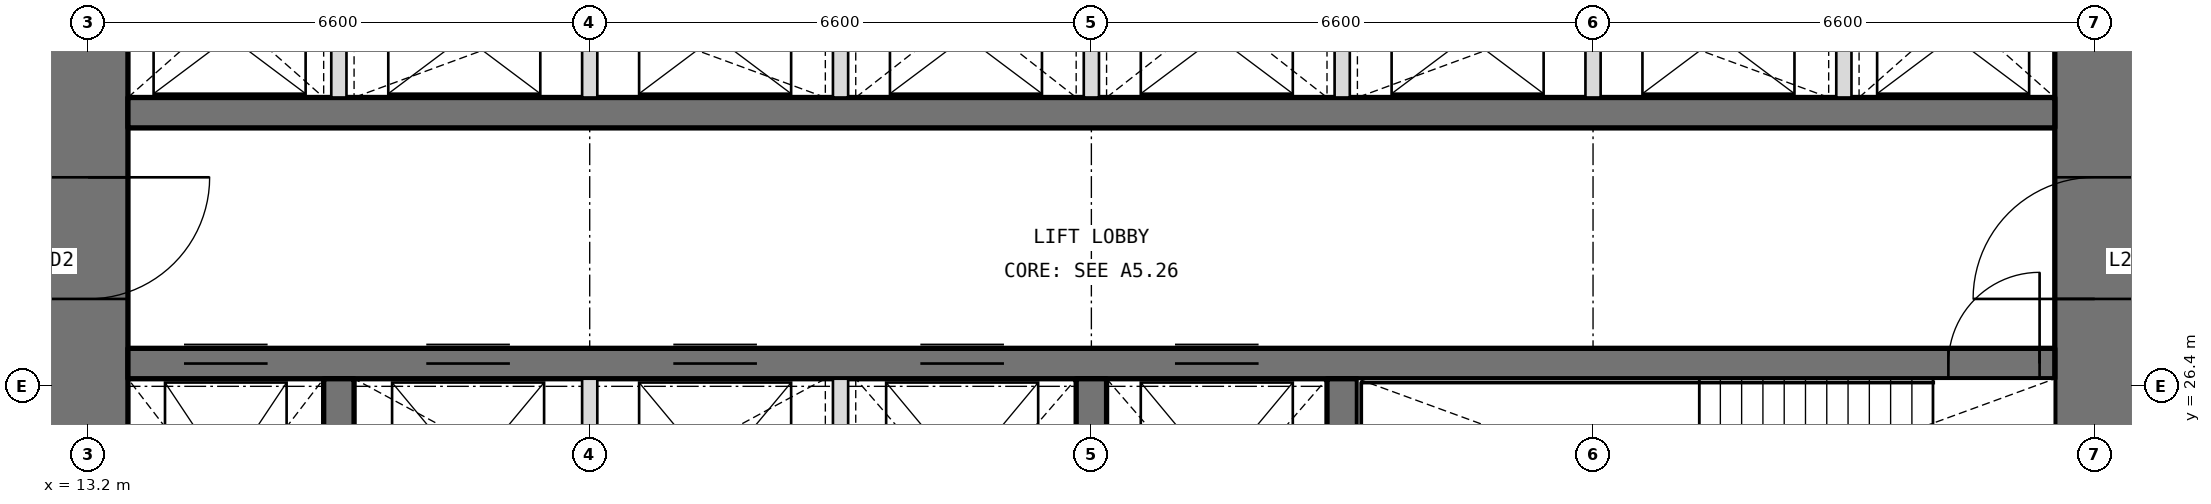
"""IFC4 building model, lengths in metres.
Left out: names, types, materials, properties, quantities, classifications, styles, units other than length and angle.
Written with IfcOpenShell. Run it as: python <this file> out.ifc"""

import sys

from ifc_helpers import new_model, si_unit, direction, frame, frame_2d, origin, place, context, subcontext, project, spatial, rectangle, extrude, element, fill, save


model = new_model("IFC4")
c1 = context("Model", 3, precision=1e-05, world=origin(), true_north=direction((0.0, 1.0)))
c2 = subcontext(c1, "Body", "Model", "MODEL_VIEW")
j1 = project(units=[si_unit("LENGTHUNIT", "METRE"), si_unit("PLANEANGLEUNIT", "RADIAN")], contexts=[c1])
p1 = place(None, origin())
s1 = spatial("IfcSite", under=j1, at=p1, CompositionType="ELEMENT")
p2 = place(p1, origin())
s2 = spatial("IfcBuilding", under=s1, at=p2, CompositionType="ELEMENT")
p3 = place(p2, frame((0.0, 0.0, 107.4)))
s3 = spatial("IfcBuildingStorey", under=s2, at=p3, CompositionType="ELEMENT", Elevation=107.4)
p4 = place(p3, frame((39.6, 13.725, 0.0), z_axis=(0.0, 0.0, 1.0), x_axis=(0.0, 1.0, 0.0)))
e1 = element("IfcWall", 1, at=p4, inside=s3, PredefinedType="SHEAR", context=c2, shape_type="SweptSolid", body=[
    extrude(rectangle(XDim=18.75, YDim=1.05, at=frame_2d((9.375, 0.0))), origin(), (0.0, 0.0, 1.0), 4.2),
])
p5 = place(p4, frame((3.025, 0.0, 0.0)))
e2 = element("IfcOpeningElement", 2, at=p5, cuts=e1, PredefinedType="OPENING", context=c2, shape_type="SweptSolid", body=[
    extrude(rectangle(XDim=1.6, YDim=2.1, at=frame_2d((0.8, 1.05))), frame((0.0, 0.535, 0.0), z_axis=(0.0, -1.0, 0.0), x_axis=(1.0, 0.0, 0.0)), (0.0, 0.0, 1.0), 1.07),
])
p6 = place(p4, frame((13.825, 0.0, 0.0)))
e3 = element("IfcOpeningElement", 3, at=p6, cuts=e1, PredefinedType="OPENING", context=c2, shape_type="SweptSolid", body=[
    extrude(rectangle(XDim=1.6, YDim=2.1, at=frame_2d((0.8, 1.05))), frame((0.0, 0.535, 0.0), z_axis=(0.0, -1.0, 0.0), x_axis=(1.0, 0.0, 0.0)), (0.0, 0.0, 1.0), 1.07),
])
p7 = place(p3, frame((13.2, 32.475, 0.0), z_axis=(0.0, 0.0, 1.0), x_axis=(0.0, -1.0, 0.0)))
e4 = element("IfcWall", 4, at=p7, inside=s3, PredefinedType="SHEAR", context=c2, shape_type="SweptSolid", body=[
    extrude(rectangle(XDim=18.75, YDim=1.05, at=frame_2d((9.375, 0.0))), origin(), (0.0, 0.0, 1.0), 4.2),
])
p8 = place(p7, frame((14.125, 0.0, 0.0)))
e5 = element("IfcOpeningElement", 5, at=p8, cuts=e4, PredefinedType="OPENING", context=c2, shape_type="SweptSolid", body=[
    extrude(rectangle(XDim=1.6, YDim=2.1, at=frame_2d((0.8, 1.05))), frame((0.0, 0.535, 0.0), z_axis=(0.0, -1.0, 0.0), x_axis=(1.0, 0.0, 0.0)), (0.0, 0.0, 1.0), 1.07),
])
p9 = place(p7, frame((3.325, 0.0, 0.0)))
e6 = element("IfcOpeningElement", 6, at=p9, cuts=e4, PredefinedType="OPENING", context=c2, shape_type="SweptSolid", body=[
    extrude(rectangle(XDim=1.6, YDim=2.1, at=frame_2d((0.8, 1.05))), frame((0.0, 0.535, 0.0), z_axis=(0.0, -1.0, 0.0), x_axis=(1.0, 0.0, 0.0)), (0.0, 0.0, 1.0), 1.07),
])
p10 = place(p3, frame((13.725, 26.7, 0.0), z_axis=(0.0, 0.0, 1.0), x_axis=(1.0, 0.0, 0.0)))
e7 = element("IfcWall", 7, at=p10, inside=s3, PredefinedType="SHEAR", context=c2, shape_type="SweptSolid", body=[
    extrude(rectangle(XDim=25.35, YDim=0.4, at=frame_2d((12.675, 0.0))), origin(), (0.0, 0.0, 1.0), 4.2),
])
p11 = place(p10, frame((23.95, 0.0, 0.0)))
e8 = element("IfcOpeningElement", 8, at=p11, cuts=e7, PredefinedType="OPENING", context=c2, shape_type="SweptSolid", body=[
    extrude(rectangle(XDim=1.2, YDim=2.1, at=frame_2d((0.6, 1.05))), frame((0.0, 0.21, 0.0), z_axis=(0.0, -1.0, 0.0), x_axis=(1.0, 0.0, 0.0)), (0.0, 0.0, 1.0), 0.42),
])
p12 = place(p10, frame((0.738, 0.0, 0.0)))
e9 = element("IfcOpeningElement", 9, at=p12, cuts=e7, PredefinedType="OPENING", context=c2, shape_type="SweptSolid", body=[
    extrude(rectangle(XDim=1.1, YDim=2.1, at=frame_2d((0.55, 1.05))), frame((0.0, 0.21, 0.0), z_axis=(0.0, -1.0, 0.0), x_axis=(1.0, 0.0, 0.0)), (0.0, 0.0, 1.0), 0.42),
])
p13 = place(p10, frame((3.925, 0.0, 0.0)))
e10 = element("IfcOpeningElement", 10, at=p13, cuts=e7, PredefinedType="OPENING", context=c2, shape_type="SweptSolid", body=[
    extrude(rectangle(XDim=1.1, YDim=2.1, at=frame_2d((0.55, 1.05))), frame((0.0, 0.21, 0.0), z_axis=(0.0, -1.0, 0.0), x_axis=(1.0, 0.0, 0.0)), (0.0, 0.0, 1.0), 0.42),
])
p14 = place(p10, frame((7.175, 0.0, 0.0)))
e11 = element("IfcOpeningElement", 11, at=p14, cuts=e7, PredefinedType="OPENING", context=c2, shape_type="SweptSolid", body=[
    extrude(rectangle(XDim=1.1, YDim=2.1, at=frame_2d((0.55, 1.05))), frame((0.0, 0.21, 0.0), z_axis=(0.0, -1.0, 0.0), x_axis=(1.0, 0.0, 0.0)), (0.0, 0.0, 1.0), 0.42),
])
p15 = place(p10, frame((10.425, 0.0, 0.0)))
e12 = element("IfcOpeningElement", 12, at=p15, cuts=e7, PredefinedType="OPENING", context=c2, shape_type="SweptSolid", body=[
    extrude(rectangle(XDim=1.1, YDim=2.1, at=frame_2d((0.55, 1.05))), frame((0.0, 0.21, 0.0), z_axis=(0.0, -1.0, 0.0), x_axis=(1.0, 0.0, 0.0)), (0.0, 0.0, 1.0), 0.42),
])
p16 = place(p10, frame((13.775, 0.0, 0.0)))
e13 = element("IfcOpeningElement", 13, at=p16, cuts=e7, PredefinedType="OPENING", context=c2, shape_type="SweptSolid", body=[
    extrude(rectangle(XDim=1.1, YDim=2.1, at=frame_2d((0.55, 1.05))), frame((0.0, 0.21, 0.0), z_axis=(0.0, -1.0, 0.0), x_axis=(1.0, 0.0, 0.0)), (0.0, 0.0, 1.0), 0.42),
])
p17 = place(p3, frame((13.725, 30.0, 0.0), z_axis=(0.0, 0.0, 1.0), x_axis=(1.0, 0.0, 0.0)))
e14 = element("IfcWall", 14, at=p17, inside=s3, PredefinedType="SHEAR", context=c2, shape_type="SweptSolid", body=[
    extrude(rectangle(XDim=25.35, YDim=0.4, at=frame_2d((12.675, 0.0))), origin(), (0.0, 0.0, 1.0), 4.2),
])
for number, where, z_axis, x_axis in (
    (15, (16.5, 23.15, 0.0), (0.0, 0.0, 1.0), (0.0, 1.0, 0.0)),
    (16, (26.4, 23.15, 0.0), (0.0, 0.0, 1.0), (0.0, 1.0, 0.0)),
    (17, (29.7, 23.15, 0.0), (0.0, 0.0, 1.0), (0.0, 1.0, 0.0)),
):
    element("IfcWall", number, at=place(p3, frame(where, z_axis=z_axis, x_axis=x_axis)), inside=s3, PredefinedType="SHEAR", context=c2, shape_type="SweptSolid", body=[
        extrude(rectangle(XDim=3.35, YDim=0.4, at=frame_2d((1.675, 0.0))), origin(), (0.0, 0.0, 1.0), 4.2),
    ])
for number, where, z_axis, x_axis in (
    (18, (16.5, 30.2, 0.0), (0.0, 0.0, 1.0), (0.0, 1.0, 0.0)),
    (19, (19.8, 30.2, 0.0), (0.0, 0.0, 1.0), (0.0, 1.0, 0.0)),
    (20, (23.1, 30.2, 0.0), (0.0, 0.0, 1.0), (0.0, 1.0, 0.0)),
    (21, (26.4, 30.2, 0.0), (0.0, 0.0, 1.0), (0.0, 1.0, 0.0)),
    (22, (29.7, 30.2, 0.0), (0.0, 0.0, 1.0), (0.0, 1.0, 0.0)),
    (23, (33.0, 30.2, 0.0), (0.0, 0.0, 1.0), (0.0, 1.0, 0.0)),
    (24, (36.3, 30.2, 0.0), (0.0, 0.0, 1.0), (0.0, 1.0, 0.0)),
):
    element("IfcWall", number, at=place(p3, frame(where, z_axis=z_axis, x_axis=x_axis)), inside=s3, PredefinedType="PARTITIONING", context=c2, shape_type="SweptSolid", body=[
        extrude(rectangle(XDim=2.275, YDim=0.2, at=frame_2d((1.138, 0.0))), origin(), (0.0, 0.0, 1.0), 4.2),
    ])
for number, where, z_axis, x_axis in (
    (25, (19.8, 23.15, 0.0), (0.0, 0.0, 1.0), (0.0, 1.0, 0.0)),
    (26, (23.1, 23.15, 0.0), (0.0, 0.0, 1.0), (0.0, 1.0, 0.0)),
):
    element("IfcWall", number, at=place(p3, frame(where, z_axis=z_axis, x_axis=x_axis)), inside=s3, PredefinedType="PARTITIONING", context=c2, shape_type="SweptSolid", body=[
        extrude(rectangle(XDim=3.35, YDim=0.2, at=frame_2d((1.675, 0.0))), origin(), (0.0, 0.0, 1.0), 4.2),
    ])
p18 = place(p11, origin())
e27 = element("IfcDoor", 27, at=p18, inside=s3, OperationType="SINGLE_SWING_RIGHT", PredefinedType="DOOR", context=c2, shape_type="SweptSolid", body=[
    extrude(rectangle(XDim=1.2, YDim=2.1, at=frame_2d((0.6, 1.05))), frame((0.0, 0.025, 0.0), z_axis=(0.0, -1.0, 0.0), x_axis=(1.0, 0.0, 0.0)), (0.0, 0.0, 1.0), 0.05),
])
fill(e8, e27)
p19 = place(p9, origin())
e28 = element("IfcDoor", 28, at=p19, inside=s3, OperationType="DOUBLE_DOOR_DOUBLE_SWING", PredefinedType="DOOR", context=c2, shape_type="SweptSolid", body=[
    extrude(rectangle(XDim=1.6, YDim=2.1, at=frame_2d((0.8, 1.05))), frame((0.0, 0.025, 0.0), z_axis=(0.0, -1.0, 0.0), x_axis=(1.0, 0.0, 0.0)), (0.0, 0.0, 1.0), 0.05),
])
fill(e6, e28)
p20 = place(p6, origin())
e29 = element("IfcDoor", 29, at=p20, inside=s3, OperationType="DOUBLE_DOOR_DOUBLE_SWING", PredefinedType="DOOR", context=c2, shape_type="SweptSolid", body=[
    extrude(rectangle(XDim=1.6, YDim=2.1, at=frame_2d((0.8, 1.05))), frame((0.0, 0.025, 0.0), z_axis=(0.0, -1.0, 0.0), x_axis=(1.0, 0.0, 0.0)), (0.0, 0.0, 1.0), 0.05),
])
fill(e3, e29)
p21 = place(p12, origin())
e30 = element("IfcDoor", 30, at=p21, inside=s3, OperationType="DOUBLE_DOOR_SLIDING", PredefinedType="DOOR", context=c2, shape_type="SweptSolid", body=[
    extrude(rectangle(XDim=1.1, YDim=2.1, at=frame_2d((0.55, 1.05))), frame((0.0, 0.025, 0.0), z_axis=(0.0, -1.0, 0.0), x_axis=(1.0, 0.0, 0.0)), (0.0, 0.0, 1.0), 0.05),
])
fill(e9, e30)
p22 = place(p13, origin())
e31 = element("IfcDoor", 31, at=p22, inside=s3, OperationType="DOUBLE_DOOR_SLIDING", PredefinedType="DOOR", context=c2, shape_type="SweptSolid", body=[
    extrude(rectangle(XDim=1.1, YDim=2.1, at=frame_2d((0.55, 1.05))), frame((0.0, 0.025, 0.0), z_axis=(0.0, -1.0, 0.0), x_axis=(1.0, 0.0, 0.0)), (0.0, 0.0, 1.0), 0.05),
])
fill(e10, e31)
p23 = place(p14, origin())
e32 = element("IfcDoor", 32, at=p23, inside=s3, OperationType="DOUBLE_DOOR_SLIDING", PredefinedType="DOOR", context=c2, shape_type="SweptSolid", body=[
    extrude(rectangle(XDim=1.1, YDim=2.1, at=frame_2d((0.55, 1.05))), frame((0.0, 0.025, 0.0), z_axis=(0.0, -1.0, 0.0), x_axis=(1.0, 0.0, 0.0)), (0.0, 0.0, 1.0), 0.05),
])
fill(e11, e32)
p24 = place(p15, origin())
e33 = element("IfcDoor", 33, at=p24, inside=s3, OperationType="DOUBLE_DOOR_SLIDING", PredefinedType="DOOR", context=c2, shape_type="SweptSolid", body=[
    extrude(rectangle(XDim=1.1, YDim=2.1, at=frame_2d((0.55, 1.05))), frame((0.0, 0.025, 0.0), z_axis=(0.0, -1.0, 0.0), x_axis=(1.0, 0.0, 0.0)), (0.0, 0.0, 1.0), 0.05),
])
fill(e12, e33)
p25 = place(p16, origin())
e34 = element("IfcDoor", 34, at=p25, inside=s3, OperationType="DOUBLE_DOOR_SLIDING", PredefinedType="DOOR", context=c2, shape_type="SweptSolid", body=[
    extrude(rectangle(XDim=1.1, YDim=2.1, at=frame_2d((0.55, 1.05))), frame((0.0, 0.025, 0.0), z_axis=(0.0, -1.0, 0.0), x_axis=(1.0, 0.0, 0.0)), (0.0, 0.0, 1.0), 0.05),
])
fill(e13, e34)
save(model, sys.argv[1])
